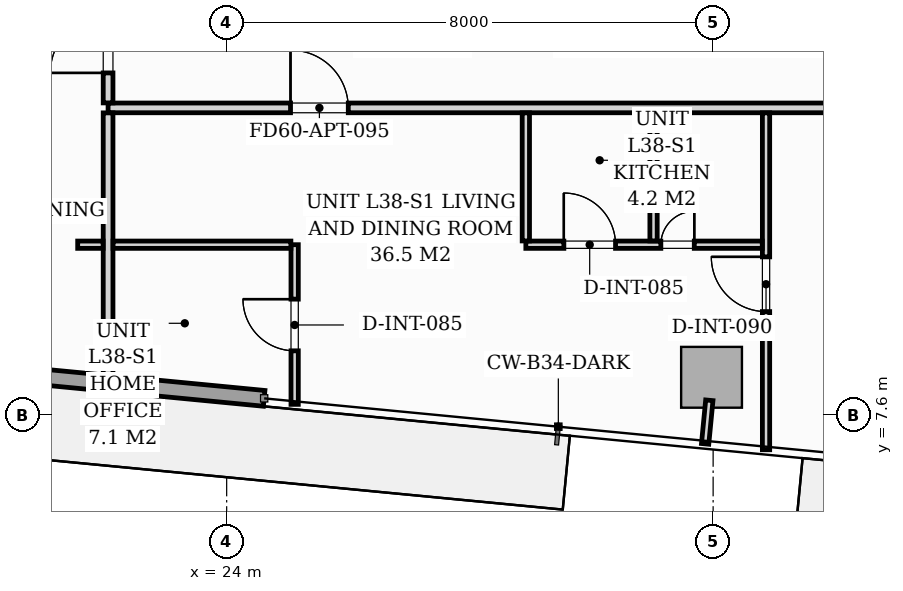
"""IFC4 building model, lengths in metres.
Left out: names, types, materials, properties, quantities, classifications, styles, units other than length and angle.
Written with IfcOpenShell. Run it as: python <this file> out.ifc"""

import sys

from ifc_helpers import new_model, si_unit, direction, frame, frame_2d, origin, origin_2d, place, context, subcontext, project, spatial, rectangle, extrude, source, transform, mapped, element, fill, save


model = new_model("IFC4")
c1 = context("Model", 3, precision=1e-05, world=origin(), true_north=direction((0.0, 1.0)))
c2 = subcontext(c1, "Body", "Model", "MODEL_VIEW")
j1 = project(units=[si_unit("LENGTHUNIT", "METRE"), si_unit("PLANEANGLEUNIT", "RADIAN")], contexts=[c1])
p1 = place(None, origin())
s1 = spatial("IfcSite", under=j1, at=p1, CompositionType="ELEMENT")
p2 = place(p1, origin())
s2 = spatial("IfcBuilding", under=s1, at=p2, CompositionType="ELEMENT")
p3 = place(p2, frame((0.0, 0.0, 134.2)))
s3 = spatial("IfcBuildingStorey", under=s2, at=p3, CompositionType="ELEMENT", Elevation=134.2)
m1 = source(origin(), c2, "Body", "SweptSolid", [
    extrude(rectangle(XDim=1.0, YDim=1.0, at=origin_2d()), origin(), (0.0, 0.0, 1.0), 3.196),
])
p4 = place(p3, frame((31.974, 8.22, 0.002), z_axis=(0.0, 0.0, 1.0), x_axis=(0.995396198367, -0.09584575252, 0.0)))
e1 = element("IfcColumn", 1, at=p4, inside=s3, PredefinedType="COLUMN", context=c2, shape_type="MappedRepresentation", body=[
    mapped(m1, transform((0.0, 0.0, 0.0), scale=1.0)),
])
p5 = place(p3, frame((24.617, 7.873, 0.0), z_axis=(0.0, 0.0, 1.0), x_axis=(-0.995395976631, 0.095848055311, 0.0)))
e2 = element("IfcWall", 2, at=p5, inside=s3, PredefinedType="STANDARD", context=c2, shape_type="SweptSolid", body=[
    extrude(rectangle(XDim=17.01, YDim=0.26, at=frame_2d((8.505, 0.0))), origin(), (0.0, 0.0, 1.0), 2.94),
])
p6 = place(p5, frame((7.07, 0.0, 0.0)))
e3 = element("IfcOpeningElement", 3, at=p6, cuts=e2, PredefinedType="OPENING", context=c2, shape_type="SweptSolid", body=[
    extrude(rectangle(XDim=1.8, YDim=2.06, at=frame_2d((0.9, 1.03))), frame((0.0, 0.14, 0.0), z_axis=(0.0, -1.0, 0.0), x_axis=(1.0, 0.0, 0.0)), (0.0, 0.0, 1.0), 0.28),
])
p7 = place(p5, frame((9.7, 0.0, 0.65)))
e4 = element("IfcOpeningElement", 4, at=p7, cuts=e2, PredefinedType="OPENING", context=c2, shape_type="SweptSolid", body=[
    extrude(rectangle(XDim=1.6, YDim=1.5, at=frame_2d((0.8, 0.75))), frame((0.0, 0.14, 0.0), z_axis=(0.0, -1.0, 0.0), x_axis=(1.0, 0.0, 0.0)), (0.0, 0.0, 1.0), 0.28),
])
p8 = place(p3, frame((22.05, 12.65, 0.0), z_axis=(0.0, 0.0, 1.0), x_axis=(1.0, 0.0, 0.0)))
e5 = element("IfcWall", 5, at=p8, inside=s3, PredefinedType="PARTITIONING", context=c2, shape_type="SweptSolid", body=[
    extrude(rectangle(XDim=23.83, YDim=0.16, at=frame_2d((11.915, 0.0))), origin(), (0.0, 0.0, 1.0), 2.94),
])
p9 = place(p8, frame((3.0, 0.0, 0.0)))
e6 = element("IfcOpeningElement", 6, at=p9, cuts=e5, PredefinedType="OPENING", context=c2, shape_type="SweptSolid", body=[
    extrude(rectangle(XDim=0.95, YDim=2.06, at=frame_2d((0.475, 1.03))), frame((0.0, 0.09, 0.0), z_axis=(0.0, -1.0, 0.0), x_axis=(1.0, 0.0, 0.0)), (0.0, 0.0, 1.0), 0.18),
])
p10 = place(p8, frame((15.485, 0.0, 0.0)))
e7 = element("IfcOpeningElement", 7, at=p10, cuts=e5, PredefinedType="OPENING", context=c2, shape_type="SweptSolid", body=[
    extrude(rectangle(XDim=0.95, YDim=2.06, at=frame_2d((0.475, 1.03))), frame((0.0, 0.09, 0.0), z_axis=(0.0, -1.0, 0.0), x_axis=(1.0, 0.0, 0.0)), (0.0, 0.0, 1.0), 0.18),
])
p11 = place(p3, frame((22.05, 8.253, 0.0), z_axis=(0.0, 0.0, 1.0), x_axis=(0.0, 1.0, 0.0)))
e8 = element("IfcWall", 8, at=p11, inside=s3, PredefinedType="PARTITIONING", context=c2, shape_type="SweptSolid", body=[
    extrude(rectangle(XDim=4.315, YDim=0.16, at=frame_2d((2.157, 0.0))), origin(), (0.0, 0.0, 1.0), 2.94),
])
p12 = place(p3, frame((22.05, 12.732, 0.0), z_axis=(0.0, 0.0, 1.0), x_axis=(0.0, 1.0, 0.0)))
e9 = element("IfcWall", 9, at=p12, inside=s3, PredefinedType="PARTITIONING", context=c2, shape_type="SweptSolid", body=[
    extrude(rectangle(XDim=14.685, YDim=0.16, at=frame_2d((7.343, 0.0))), origin(), (0.0, 0.0, 1.0), 2.94),
])
p13 = place(p12, frame((0.493, 0.0, 0.0)))
e10 = element("IfcOpeningElement", 10, at=p13, cuts=e9, PredefinedType="OPENING", context=c2, shape_type="SweptSolid", body=[
    extrude(rectangle(XDim=0.95, YDim=2.06, at=frame_2d((0.475, 1.03))), frame((0.0, 0.09, 0.0), z_axis=(0.0, -1.0, 0.0), x_axis=(1.0, 0.0, 0.0)), (0.0, 0.0, 1.0), 0.18),
])
p14 = place(p12, frame((5.313, 0.0, 0.0)))
e11 = element("IfcOpeningElement", 11, at=p14, cuts=e9, PredefinedType="OPENING", context=c2, shape_type="SweptSolid", body=[
    extrude(rectangle(XDim=0.85, YDim=2.0, at=frame_2d((0.425, 1.0))), frame((0.0, 0.09, 0.0), z_axis=(0.0, -1.0, 0.0), x_axis=(1.0, 0.0, 0.0)), (0.0, 0.0, 1.0), 0.18),
])
p15 = place(p3, frame((32.87, 7.028, 0.0), z_axis=(0.0, 0.0, 1.0), x_axis=(0.0, 1.0, 0.0)))
e12 = element("IfcWall", 12, at=p15, inside=s3, PredefinedType="PARTITIONING", context=c2, shape_type="SweptSolid", body=[
    extrude(rectangle(XDim=5.54, YDim=0.12, at=frame_2d((2.77, 0.0))), origin(), (0.0, 0.0, 1.0), 2.94),
])
p16 = place(p15, frame((2.272, 0.0, 0.0)))
e13 = element("IfcOpeningElement", 13, at=p16, cuts=e12, PredefinedType="OPENING", context=c2, shape_type="SweptSolid", body=[
    extrude(rectangle(XDim=0.9, YDim=2.05, at=frame_2d((0.45, 1.025))), frame((0.0, 0.07, 0.0), z_axis=(0.0, -1.0, 0.0), x_axis=(1.0, 0.0, 0.0)), (0.0, 0.0, 1.0), 0.14),
])
p17 = place(p3, frame((28.92, 10.4, 0.0), z_axis=(0.0, 0.0, 1.0), x_axis=(1.0, 0.0, 0.0)))
e14 = element("IfcWall", 14, at=p17, inside=s3, PredefinedType="PARTITIONING", context=c2, shape_type="SweptSolid", body=[
    extrude(rectangle(XDim=3.888, YDim=0.12, at=frame_2d((1.944, 0.0))), origin(), (0.0, 0.0, 1.0), 2.94),
])
p18 = place(p17, frame((0.625, 0.0, 0.0)))
e15 = element("IfcOpeningElement", 15, at=p18, cuts=e14, PredefinedType="OPENING", context=c2, shape_type="SweptSolid", body=[
    extrude(rectangle(XDim=0.85, YDim=2.05, at=frame_2d((0.425, 1.025))), frame((0.0, 0.07, 0.0), z_axis=(0.0, -1.0, 0.0), x_axis=(1.0, 0.0, 0.0)), (0.0, 0.0, 1.0), 0.14),
])
p19 = place(p17, frame((2.22, 0.0, 0.0)))
e16 = element("IfcOpeningElement", 16, at=p19, cuts=e14, PredefinedType="OPENING", context=c2, shape_type="SweptSolid", body=[
    extrude(rectangle(XDim=0.55, YDim=2.0, at=frame_2d((0.275, 1.0))), frame((0.0, 0.07, 0.0), z_axis=(0.0, -1.0, 0.0), x_axis=(1.0, 0.0, 0.0)), (0.0, 0.0, 1.0), 0.14),
])
for number, where, z_axis, x_axis in (
    (17, (31.02, 10.462, 0.0), (0.0, 0.0, 1.0), (0.0, 1.0, 0.0)),
    (18, (28.92, 10.462, 0.0), (0.0, 0.0, 1.0), (0.0, 1.0, 0.0)),
):
    element("IfcWall", number, at=place(p3, frame(where, z_axis=z_axis, x_axis=x_axis)), inside=s3, PredefinedType="PARTITIONING", context=c2, shape_type="SweptSolid", body=[
        extrude(rectangle(XDim=2.106, YDim=0.12, at=frame_2d((1.053, 0.0))), origin(), (0.0, 0.0, 1.0), 2.94),
    ])
p20 = place(p3, frame((25.118, 7.775, 0.0), z_axis=(0.0, 0.0, 1.0), x_axis=(0.0, 1.0, 0.0)))
e19 = element("IfcWall", 19, at=p20, inside=s3, PredefinedType="PARTITIONING", context=c2, shape_type="SweptSolid", body=[
    extrude(rectangle(XDim=2.625, YDim=0.12, at=frame_2d((1.312, 0.0))), origin(), (0.0, 0.0, 1.0), 2.94),
])
p21 = place(p20, frame((0.88, 0.0, 0.0)))
e20 = element("IfcOpeningElement", 20, at=p21, cuts=e19, PredefinedType="OPENING", context=c2, shape_type="SweptSolid", body=[
    extrude(rectangle(XDim=0.85, YDim=2.05, at=frame_2d((0.425, 1.025))), frame((0.0, 0.07, 0.0), z_axis=(0.0, -1.0, 0.0), x_axis=(1.0, 0.0, 0.0)), (0.0, 0.0, 1.0), 0.14),
])
p22 = place(p3, frame((21.55, 10.4, 0.0), z_axis=(0.0, 0.0, 1.0), x_axis=(1.0, 0.0, 0.0)))
e21 = element("IfcWall", 21, at=p22, inside=s3, PredefinedType="PARTITIONING", context=c2, shape_type="SweptSolid", body=[
    extrude(rectangle(XDim=0.418, YDim=0.12, at=frame_2d((0.209, 0.0))), origin(), (0.0, 0.0, 1.0), 2.94),
])
p23 = place(p3, frame((22.132, 10.4, 0.0), z_axis=(0.0, 0.0, 1.0), x_axis=(1.0, 0.0, 0.0)))
e22 = element("IfcWall", 22, at=p23, inside=s3, PredefinedType="PARTITIONING", context=c2, shape_type="SweptSolid", body=[
    extrude(rectangle(XDim=2.924, YDim=0.12, at=frame_2d((1.462, 0.0))), origin(), (0.0, 0.0, 1.0), 2.94),
])
p24 = place(p3, frame((10.151, 11.016, 0.0), z_axis=(0.0, 0.0, 1.0), x_axis=(1.0, 0.0, 0.0)))
e23 = element("IfcWall", 23, at=p24, inside=s3, PredefinedType="PARTITIONING", context=c2, shape_type="SweptSolid", body=[
    extrude(rectangle(XDim=11.817, YDim=0.12, at=frame_2d((5.909, 0.0))), origin(), (0.0, 0.0, 1.0), 2.94),
])
p25 = place(p24, frame((5.483, 0.0, 0.0)))
e24 = element("IfcOpeningElement", 24, at=p25, cuts=e23, PredefinedType="OPENING", context=c2, shape_type="SweptSolid", body=[
    extrude(rectangle(XDim=0.85, YDim=2.05, at=frame_2d((0.425, 1.025))), frame((0.0, 0.07, 0.0), z_axis=(0.0, -1.0, 0.0), x_axis=(1.0, 0.0, 0.0)), (0.0, 0.0, 1.0), 0.14),
])
p26 = place(p3, frame((31.938, 7.841, 0.0), z_axis=(0.0, 0.0, 1.0), x_axis=(-0.095977354523, -0.995383517755, 0.0)))
e25 = element("IfcWall", 25, at=p26, inside=s3, PredefinedType="PARTITIONING", context=c2, shape_type="SweptSolid", body=[
    extrude(rectangle(XDim=0.72, YDim=0.12, at=frame_2d((0.36, 0.0))), origin(), (0.0, 0.0, 1.0), 2.94),
])
m2 = source(origin(), c2, "Body", "SweptSolid", [
    extrude(rectangle(XDim=0.85, YDim=2.05, at=frame_2d((0.425, 1.025))), frame((0.0, 0.025, 0.0), z_axis=(0.0, -1.0, 0.0), x_axis=(1.0, 0.0, 0.0)), (0.0, 0.0, 1.0), 0.05),
])
p27 = place(p21, origin())
e26 = element("IfcDoor", 26, at=p27, inside=s3, OperationType="SINGLE_SWING_RIGHT", PredefinedType="DOOR", context=c2, shape_type="MappedRepresentation", body=[
    mapped(m2, transform((0.0, 0.0, 0.0), scale=1.0)),
])
fill(e20, e26)
m3 = source(origin(), c2, "Body", "SweptSolid", [
    extrude(rectangle(XDim=0.95, YDim=2.06, at=frame_2d((0.475, 1.03))), frame((0.0, 0.025, 0.0), z_axis=(0.0, -1.0, 0.0), x_axis=(1.0, 0.0, 0.0)), (0.0, 0.0, 1.0), 0.05),
])
p28 = place(p9, origin())
e27 = element("IfcDoor", 27, at=p28, inside=s3, OperationType="SINGLE_SWING_LEFT", PredefinedType="DOOR", context=c2, shape_type="MappedRepresentation", body=[
    mapped(m3, transform((0.0, 0.0, 0.0), scale=1.0)),
])
fill(e6, e27)
m4 = source(origin(), c2, "Body", "SweptSolid", [
    extrude(rectangle(XDim=0.9, YDim=2.05, at=frame_2d((0.45, 1.025))), frame((0.0, 0.025, 0.0), z_axis=(0.0, -1.0, 0.0), x_axis=(1.0, 0.0, 0.0)), (0.0, 0.0, 1.0), 0.05),
])
p29 = place(p16, origin())
e28 = element("IfcDoor", 28, at=p29, inside=s3, OperationType="SINGLE_SWING_RIGHT", PredefinedType="DOOR", context=c2, shape_type="MappedRepresentation", body=[
    mapped(m4, transform((0.0, 0.0, 0.0), scale=1.0)),
])
fill(e13, e28)
p30 = place(p18, origin())
e29 = element("IfcDoor", 29, at=p30, inside=s3, OperationType="SINGLE_SWING_LEFT", PredefinedType="DOOR", context=c2, shape_type="MappedRepresentation", body=[
    mapped(m2, transform((0.0, 0.0, 0.0), scale=1.0)),
])
fill(e15, e29)
m5 = source(origin(), c2, "Body", "SweptSolid", [
    extrude(rectangle(XDim=0.55, YDim=2.0, at=frame_2d((0.275, 1.0))), frame((0.0, 0.025, 0.0), z_axis=(0.0, -1.0, 0.0), x_axis=(1.0, 0.0, 0.0)), (0.0, 0.0, 1.0), 0.05),
])
p31 = place(p19, origin())
e30 = element("IfcDoor", 30, at=p31, inside=s3, OperationType="SINGLE_SWING_RIGHT", PredefinedType="DOOR", context=c2, shape_type="MappedRepresentation", body=[
    mapped(m5, transform((0.0, 0.0, 0.0), scale=1.0)),
])
fill(e16, e30)
p32 = place(p13, origin())
e31 = element("IfcDoor", 31, at=p32, inside=s3, OperationType="SINGLE_SWING_LEFT", PredefinedType="DOOR", context=c2, shape_type="MappedRepresentation", body=[
    mapped(m3, transform((0.0, 0.0, 0.0), scale=1.0)),
])
fill(e10, e31)
save(model, sys.argv[1])
